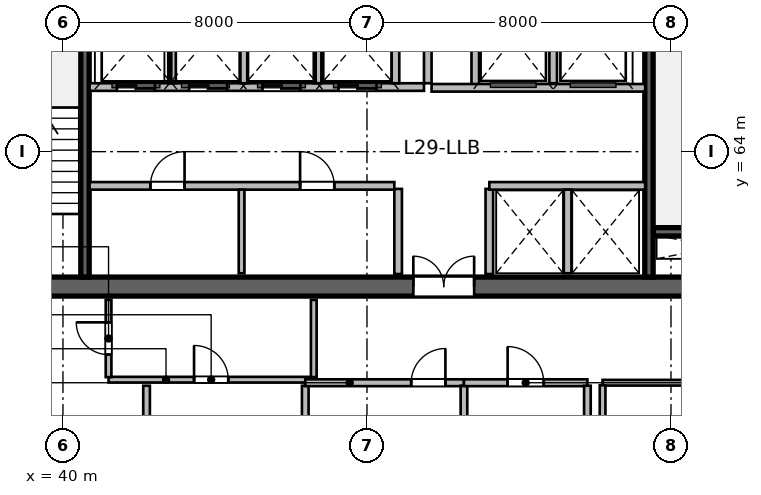
"""IFC4 building model, lengths in metres.
Left out: names, types, materials, properties, quantities, classifications, styles, units other than length and angle.
Written with IfcOpenShell. Run it as: python <this file> out.ifc"""

import sys

from ifc_helpers import new_model, si_unit, direction, frame, frame_2d, origin, place, context, subcontext, project, spatial, rectangle, extrude, source, transform, mapped, element, fill, save


model = new_model("IFC4")
c1 = context("Model", 3, precision=1e-05, world=origin(), true_north=direction((0.0, 1.0)))
c2 = subcontext(c1, "Body", "Model", "MODEL_VIEW")
j1 = project(units=[si_unit("LENGTHUNIT", "METRE"), si_unit("PLANEANGLEUNIT", "RADIAN")], contexts=[c1])
p1 = place(None, origin())
s1 = spatial("IfcSite", under=j1, at=p1, CompositionType="ELEMENT")
p2 = place(p1, origin())
s2 = spatial("IfcBuilding", under=s1, at=p2, CompositionType="ELEMENT")
p3 = place(p2, frame((0.0, 0.0, 123.3)))
s3 = spatial("IfcBuildingStorey", under=s2, at=p3, CompositionType="ELEMENT", Elevation=123.3)
m1 = source(origin(), c2, "Body", "SweptSolid", [
    extrude(rectangle(XDim=21.6, YDim=0.5, at=frame_2d((10.8, 0.0))), origin(), (0.0, 0.0, 1.0), 3.9),
])
p4 = place(p3, frame((37.2, 60.45, 0.0), z_axis=(0.0, 0.0, 1.0), x_axis=(1.0, 0.0, 0.0)))
e1 = element("IfcWall", 1, at=p4, inside=s3, PredefinedType="SHEAR", context=c2, shape_type="MappedRepresentation", body=[
    mapped(m1, transform((0.0, 0.0, 0.0), scale=1.0)),
])
p5 = place(p4, frame((1.1, 0.0, 0.0)))
e2 = element("IfcOpeningElement", 2, at=p5, cuts=e1, PredefinedType="OPENING", context=c2, shape_type="SweptSolid", body=[
    extrude(rectangle(XDim=1.15, YDim=2.15, at=frame_2d((0.575, 1.075))), frame((0.0, 0.26, 0.0), z_axis=(0.0, -1.0, 0.0), x_axis=(1.0, 0.0, 0.0)), (0.0, 0.0, 1.0), 0.52),
])
p6 = place(p4, frame((19.5, 0.0, 0.0)))
e3 = element("IfcOpeningElement", 3, at=p6, cuts=e1, PredefinedType="OPENING", context=c2, shape_type="SweptSolid", body=[
    extrude(rectangle(XDim=0.9, YDim=2.1, at=frame_2d((0.45, 1.05))), frame((0.0, 0.26, 0.0), z_axis=(0.0, -1.0, 0.0), x_axis=(1.0, 0.0, 0.0)), (0.0, 0.0, 1.0), 0.52),
])
p7 = place(p4, frame((12.02, 0.0, 0.0)))
e4 = element("IfcOpeningElement", 4, at=p7, cuts=e1, PredefinedType="OPENING", context=c2, shape_type="SweptSolid", body=[
    extrude(rectangle(XDim=1.6, YDim=2.15, at=frame_2d((0.8, 1.075))), frame((0.0, 0.26, 0.0), z_axis=(0.0, -1.0, 0.0), x_axis=(1.0, 0.0, 0.0)), (0.0, 0.0, 1.0), 0.52),
])
m2 = source(origin(), c2, "Body", "SweptSolid", [
    extrude(rectangle(XDim=3.27, YDim=0.22, at=frame_2d((1.635, 0.0))), origin(), (0.0, 0.0, 1.0), 3.9),
])
p8 = place(p3, frame((55.53, 61.89, 0.0), z_axis=(0.0, 0.0, 1.0), x_axis=(1.0, 0.0, 0.0)))
e5 = element("IfcWall", 5, at=p8, inside=s3, PredefinedType="SHEAR", context=c2, shape_type="MappedRepresentation", body=[
    mapped(m2, transform((0.0, 0.0, 0.0), scale=1.0)),
])
m3 = source(origin(), c2, "Body", "SweptSolid", [
    extrude(rectangle(XDim=11.0, YDim=0.22, at=frame_2d((5.5, 0.0))), origin(), (0.0, 0.0, 1.0), 3.9),
])
p9 = place(p3, frame((40.58, 60.7, 0.0), z_axis=(0.0, 0.0, 1.0), x_axis=(0.0, 1.0, 0.0)))
e6 = element("IfcWall", 6, at=p9, inside=s3, PredefinedType="SHEAR", context=c2, shape_type="MappedRepresentation", body=[
    mapped(m3, transform((0.0, 0.0, 0.0), scale=1.0)),
])
p10 = place(p3, frame((55.42, 60.7, 0.0), z_axis=(0.0, 0.0, 1.0), x_axis=(0.0, 1.0, 0.0)))
e7 = element("IfcWall", 7, at=p10, inside=s3, PredefinedType="SHEAR", context=c2, shape_type="MappedRepresentation", body=[
    mapped(m3, transform((0.0, 0.0, 0.0), scale=1.0)),
])
p11 = place(p10, frame((9.545, 0.0, 0.0)))
e8 = element("IfcOpeningElement", 8, at=p11, cuts=e7, PredefinedType="OPENING", context=c2, shape_type="SweptSolid", body=[
    extrude(rectangle(XDim=1.15, YDim=2.15, at=frame_2d((0.575, 1.075))), frame((0.0, 0.12, 0.0), z_axis=(0.0, -1.0, 0.0), x_axis=(1.0, 0.0, 0.0)), (0.0, 0.0, 1.0), 0.24),
])
m4 = source(origin(), c2, "Body", "SweptSolid", [
    extrude(rectangle(XDim=2.24, YDim=0.2, at=frame_2d((1.12, 0.0))), origin(), (0.0, 0.0, 1.0), 3.65),
])
for number, where, z_axis, x_axis in (
    (9, (48.82, 60.78, 0.0), (0.0, 0.0, 1.0), (0.0, 1.0, 0.0)),
    (10, (51.22, 60.78, 0.0), (0.0, 0.0, 1.0), (0.0, 1.0, 0.0)),
):
    element("IfcWall", number, at=place(p3, frame(where, z_axis=z_axis, x_axis=x_axis)), inside=s3, PredefinedType="SOLIDWALL", context=c2, shape_type="MappedRepresentation", body=[
        mapped(m4, transform((0.0, 0.0, 0.0), scale=1.0)),
    ])
m5 = source(origin(), c2, "Body", "SweptSolid", [
    extrude(rectangle(XDim=5.8, YDim=0.2, at=frame_2d((2.9, 0.0))), origin(), (0.0, 0.0, 1.0), 3.65),
])
p12 = place(p3, frame((49.6, 65.8, 0.0), z_axis=(0.0, 0.0, 1.0), x_axis=(0.0, 1.0, 0.0)))
e11 = element("IfcWall", 11, at=p12, inside=s3, PredefinedType="SOLIDWALL", context=c2, shape_type="MappedRepresentation", body=[
    mapped(m5, transform((0.0, 0.0, 0.0), scale=1.0)),
])
m6 = source(origin(), c2, "Body", "SweptSolid", [
    extrude(rectangle(XDim=2.58, YDim=0.2, at=frame_2d((1.29, 0.0))), origin(), (0.0, 0.0, 1.0), 3.65),
])
p13 = place(p3, frame((50.85, 65.68, 0.0), z_axis=(0.0, 0.0, 1.0), x_axis=(0.0, 1.0, 0.0)))
e12 = element("IfcWall", 12, at=p13, inside=s3, PredefinedType="SOLIDWALL", context=c2, shape_type="MappedRepresentation", body=[
    mapped(m6, transform((0.0, 0.0, 0.0), scale=1.0)),
])
m7 = source(origin(), c2, "Body", "SweptSolid", [
    extrude(rectangle(XDim=2.4, YDim=0.2, at=frame_2d((1.2, 0.0))), origin(), (0.0, 0.0, 1.0), 3.65),
])
p14 = place(p3, frame((52.9, 65.8, 0.0), z_axis=(0.0, 0.0, 1.0), x_axis=(0.0, 1.0, 0.0)))
e13 = element("IfcWall", 13, at=p14, inside=s3, PredefinedType="SOLIDWALL", context=c2, shape_type="MappedRepresentation", body=[
    mapped(m7, transform((0.0, 0.0, 0.0), scale=1.0)),
])
m8 = source(origin(), c2, "Body", "SweptSolid", [
    extrude(rectangle(XDim=5.62, YDim=0.2, at=frame_2d((2.81, 0.0))), origin(), (0.0, 0.0, 1.0), 3.65),
])
p15 = place(p3, frame((49.7, 65.68, 0.0), z_axis=(0.0, 0.0, 1.0), x_axis=(1.0, 0.0, 0.0)))
e14 = element("IfcWall", 14, at=p15, inside=s3, PredefinedType="SOLIDWALL", context=c2, shape_type="MappedRepresentation", body=[
    mapped(m8, transform((0.0, 0.0, 0.0), scale=1.0)),
])
m9 = source(origin(), c2, "Body", "SweptSolid", [
    extrude(rectangle(XDim=8.02, YDim=0.2, at=frame_2d((4.01, 0.0))), origin(), (0.0, 0.0, 1.0), 3.65),
])
p16 = place(p3, frame((40.7, 63.1, 0.0), z_axis=(0.0, 0.0, 1.0), x_axis=(1.0, 0.0, 0.0)))
e15 = element("IfcWall", 15, at=p16, inside=s3, PredefinedType="SOLIDWALL", context=c2, shape_type="MappedRepresentation", body=[
    mapped(m9, transform((0.0, 0.0, 0.0), scale=1.0)),
])
p17 = place(p16, frame((1.6, 0.0, 0.0)))
e16 = element("IfcOpeningElement", 16, at=p17, cuts=e15, PredefinedType="OPENING", context=c2, shape_type="SweptSolid", body=[
    extrude(rectangle(XDim=0.9, YDim=2.1, at=frame_2d((0.45, 1.05))), frame((0.0, 0.11, 0.0), z_axis=(0.0, -1.0, 0.0), x_axis=(1.0, 0.0, 0.0)), (0.0, 0.0, 1.0), 0.22),
])
p18 = place(p16, frame((5.54, 0.0, 0.0)))
e17 = element("IfcOpeningElement", 17, at=p18, cuts=e15, PredefinedType="OPENING", context=c2, shape_type="SweptSolid", body=[
    extrude(rectangle(XDim=0.9, YDim=2.1, at=frame_2d((0.45, 1.05))), frame((0.0, 0.11, 0.0), z_axis=(0.0, -1.0, 0.0), x_axis=(1.0, 0.0, 0.0)), (0.0, 0.0, 1.0), 0.22),
])
m10 = source(origin(), c2, "Body", "SweptSolid", [
    extrude(rectangle(XDim=4.1, YDim=0.2, at=frame_2d((2.05, 0.0))), origin(), (0.0, 0.0, 1.0), 3.65),
])
p19 = place(p3, frame((51.22, 63.1, 0.0), z_axis=(0.0, 0.0, 1.0), x_axis=(1.0, 0.0, 0.0)))
e18 = element("IfcWall", 18, at=p19, inside=s3, PredefinedType="SOLIDWALL", context=c2, shape_type="MappedRepresentation", body=[
    mapped(m10, transform((0.0, 0.0, 0.0), scale=1.0)),
])
m11 = source(origin(), c2, "Body", "SweptSolid", [
    extrude(rectangle(XDim=2.2, YDim=0.15, at=frame_2d((1.1, 0.0))), origin(), (0.0, 0.0, 1.0), 3.65),
])
p20 = place(p3, frame((44.7, 60.8, 0.0), z_axis=(0.0, 0.0, 1.0), x_axis=(0.0, 1.0, 0.0)))
e19 = element("IfcWall", 19, at=p20, inside=s3, PredefinedType="PARTITIONING", context=c2, shape_type="MappedRepresentation", body=[
    mapped(m11, transform((0.0, 0.0, 0.0), scale=1.0)),
])
m12 = source(origin(), c2, "Body", "SweptSolid", [
    extrude(rectangle(XDim=2.2, YDim=0.2, at=frame_2d((1.1, 0.0))), origin(), (0.0, 0.0, 1.0), 3.65),
])
p21 = place(p3, frame((53.28, 60.8, 0.0), z_axis=(0.0, 0.0, 1.0), x_axis=(0.0, 1.0, 0.0)))
e20 = element("IfcWall", 20, at=p21, inside=s3, PredefinedType="SOLIDWALL", context=c2, shape_type="MappedRepresentation", body=[
    mapped(m12, transform((0.0, 0.0, 0.0), scale=1.0)),
])
m13 = source(origin(), c2, "Body", "SweptSolid", [
    extrude(rectangle(XDim=8.8, YDim=0.2, at=frame_2d((4.4, 0.0))), origin(), (0.0, 0.0, 1.0), 3.65),
])
p22 = place(p3, frame((40.7, 65.7, 0.0), z_axis=(0.0, 0.0, 1.0), x_axis=(1.0, 0.0, 0.0)))
e21 = element("IfcWall", 21, at=p22, inside=s3, PredefinedType="SOLIDWALL", context=c2, shape_type="MappedRepresentation", body=[
    mapped(m13, transform((0.0, 0.0, 0.0), scale=1.0)),
])
p23 = place(p22, frame((0.72, 0.0, 0.0)))
e22 = element("IfcOpeningElement", 22, at=p23, cuts=e21, PredefinedType="OPENING", context=c2, shape_type="SweptSolid", body=[
    extrude(rectangle(XDim=1.0, YDim=2.15, at=frame_2d((0.5, 1.075))), frame((0.0, 0.11, 0.0), z_axis=(0.0, -1.0, 0.0), x_axis=(1.0, 0.0, 0.0)), (0.0, 0.0, 1.0), 0.22),
])
p24 = place(p22, frame((2.62, 0.0, 0.0)))
e23 = element("IfcOpeningElement", 23, at=p24, cuts=e21, PredefinedType="OPENING", context=c2, shape_type="SweptSolid", body=[
    extrude(rectangle(XDim=1.0, YDim=2.15, at=frame_2d((0.5, 1.075))), frame((0.0, 0.11, 0.0), z_axis=(0.0, -1.0, 0.0), x_axis=(1.0, 0.0, 0.0)), (0.0, 0.0, 1.0), 0.22),
])
p25 = place(p22, frame((4.55, 0.0, 0.0)))
e24 = element("IfcOpeningElement", 24, at=p25, cuts=e21, PredefinedType="OPENING", context=c2, shape_type="SweptSolid", body=[
    extrude(rectangle(XDim=1.0, YDim=2.15, at=frame_2d((0.5, 1.075))), frame((0.0, 0.11, 0.0), z_axis=(0.0, -1.0, 0.0), x_axis=(1.0, 0.0, 0.0)), (0.0, 0.0, 1.0), 0.22),
])
p26 = place(p22, frame((6.55, 0.0, 0.0)))
e25 = element("IfcOpeningElement", 25, at=p26, cuts=e21, PredefinedType="OPENING", context=c2, shape_type="SweptSolid", body=[
    extrude(rectangle(XDim=1.0, YDim=2.15, at=frame_2d((0.5, 1.075))), frame((0.0, 0.11, 0.0), z_axis=(0.0, -1.0, 0.0), x_axis=(1.0, 0.0, 0.0)), (0.0, 0.0, 1.0), 0.22),
])
for number, where, z_axis, x_axis in (
    (26, (48.75, 65.8, 0.0), (0.0, 0.0, 1.0), (0.0, 1.0, 0.0)),
    (27, (42.87, 65.8, 0.0), (0.0, 0.0, 1.0), (0.0, 1.0, 0.0)),
    (28, (44.77, 65.8, 0.0), (0.0, 0.0, 1.0), (0.0, 1.0, 0.0)),
    (29, (46.7, 65.8, 0.0), (0.0, 0.0, 1.0), (0.0, 1.0, 0.0)),
):
    element("IfcWall", number, at=place(p3, frame(where, z_axis=z_axis, x_axis=x_axis)), inside=s3, PredefinedType="SOLIDWALL", context=c2, shape_type="MappedRepresentation", body=[
        mapped(m7, transform((0.0, 0.0, 0.0), scale=1.0)),
    ])
m14 = source(origin(), c2, "Body", "SweptSolid", [
    extrude(rectangle(XDim=5.4, YDim=0.15, at=frame_2d((2.7, 0.0))), origin(), (0.0, 0.0, 1.0), 3.65),
])
p27 = place(p3, frame((41.2, 58.0, 0.0), z_axis=(0.0, 0.0, 1.0), x_axis=(1.0, 0.0, 0.0)))
e30 = element("IfcWall", 30, at=p27, inside=s3, PredefinedType="PARTITIONING", context=c2, shape_type="MappedRepresentation", body=[
    mapped(m14, transform((0.0, 0.0, 0.0), scale=1.0)),
])
p28 = place(p27, frame((2.25, 0.0, 0.0)))
e31 = element("IfcOpeningElement", 31, at=p28, cuts=e30, PredefinedType="OPENING", context=c2, shape_type="SweptSolid", body=[
    extrude(rectangle(XDim=0.9, YDim=2.08, at=frame_2d((0.45, 1.04))), frame((0.0, 0.085, 0.0), z_axis=(0.0, -1.0, 0.0), x_axis=(1.0, 0.0, 0.0)), (0.0, 0.0, 1.0), 0.17),
])
m15 = source(origin(), c2, "Body", "SweptSolid", [
    extrude(rectangle(XDim=2.033, YDim=0.15, at=frame_2d((1.016, 0.0))), origin(), (0.0, 0.0, 1.0), 3.65),
])
p29 = place(p3, frame((41.2, 58.067, 0.0), z_axis=(0.0, 0.0, 1.0), x_axis=(0.0, 1.0, 0.0)))
e32 = element("IfcWall", 32, at=p29, inside=s3, PredefinedType="PARTITIONING", context=c2, shape_type="MappedRepresentation", body=[
    mapped(m15, transform((0.0, 0.0, 0.0), scale=1.0)),
])
p30 = place(p29, frame((0.591, 0.0, 0.0)))
e33 = element("IfcOpeningElement", 33, at=p30, cuts=e32, PredefinedType="OPENING", context=c2, shape_type="SweptSolid", body=[
    extrude(rectangle(XDim=0.85, YDim=2.1, at=frame_2d((0.425, 1.05))), frame((0.0, 0.085, 0.0), z_axis=(0.0, -1.0, 0.0), x_axis=(1.0, 0.0, 0.0)), (0.0, 0.0, 1.0), 0.17),
])
p31 = place(p3, frame((46.6, 58.067, 0.0), z_axis=(0.0, 0.0, 1.0), x_axis=(0.0, 1.0, 0.0)))
e34 = element("IfcWall", 34, at=p31, inside=s3, PredefinedType="PARTITIONING", context=c2, shape_type="MappedRepresentation", body=[
    mapped(m15, transform((0.0, 0.0, 0.0), scale=1.0)),
])
m16 = source(origin(), c2, "Body", "SweptSolid", [
    extrude(rectangle(XDim=3.763, YDim=0.175, at=frame_2d((1.881, 0.0))), origin(), (0.0, 0.0, 1.0), 3.65),
])
for number, where, z_axis, x_axis in (
    (35, (42.2, 54.079, 0.0), (0.0, 0.0, 1.0), (0.0, 1.0, 0.0)),
    (36, (46.376, 54.079, 0.0), (0.0, 0.0, 1.0), (0.0, 1.0, 0.0)),
):
    element("IfcWall", number, at=place(p3, frame(where, z_axis=z_axis, x_axis=x_axis)), inside=s3, PredefinedType="PARTITIONING", context=c2, shape_type="MappedRepresentation", body=[
        mapped(m16, transform((0.0, 0.0, 0.0), scale=1.0)),
    ])
m17 = source(origin(), c2, "Body", "SweptSolid", [
    extrude(rectangle(XDim=4.176, YDim=0.18, at=frame_2d((2.088, 0.0))), origin(), (0.0, 0.0, 1.0), 3.65),
])
p32 = place(p3, frame((46.376, 57.92, 0.0), z_axis=(0.0, 0.0, 1.0), x_axis=(1.0, 0.0, 0.0)))
e37 = element("IfcWall", 37, at=p32, inside=s3, PredefinedType="PLUMBINGWALL", context=c2, shape_type="MappedRepresentation", body=[
    mapped(m17, transform((0.0, 0.0, 0.0), scale=1.0)),
])
p33 = place(p32, frame((2.788, 0.0, 0.0)))
e38 = element("IfcOpeningElement", 38, at=p33, cuts=e37, PredefinedType="OPENING", context=c2, shape_type="SweptSolid", body=[
    extrude(rectangle(XDim=0.9, YDim=2.08, at=frame_2d((0.45, 1.04))), frame((0.0, 0.1, 0.0), z_axis=(0.0, -1.0, 0.0), x_axis=(1.0, 0.0, 0.0)), (0.0, 0.0, 1.0), 0.2),
])
p34 = place(p3, frame((50.552, 54.079, 0.0), z_axis=(0.0, 0.0, 1.0), x_axis=(0.0, 1.0, 0.0)))
e39 = element("IfcWall", 39, at=p34, inside=s3, PredefinedType="PARTITIONING", context=c2, shape_type="MappedRepresentation", body=[
    mapped(m16, transform((0.0, 0.0, 0.0), scale=1.0)),
])
m18 = source(origin(), c2, "Body", "SweptSolid", [
    extrude(rectangle(XDim=3.248, YDim=0.18, at=frame_2d((1.624, 0.0))), origin(), (0.0, 0.0, 1.0), 3.65),
])
p35 = place(p3, frame((50.552, 57.92, 0.0), z_axis=(0.0, 0.0, 1.0), x_axis=(1.0, 0.0, 0.0)))
e40 = element("IfcWall", 40, at=p35, inside=s3, PredefinedType="PLUMBINGWALL", context=c2, shape_type="MappedRepresentation", body=[
    mapped(m18, transform((0.0, 0.0, 0.0), scale=1.0)),
])
p36 = place(p35, frame((1.149, 0.0, 0.0)))
e41 = element("IfcOpeningElement", 41, at=p36, cuts=e40, PredefinedType="OPENING", context=c2, shape_type="SweptSolid", body=[
    extrude(rectangle(XDim=0.95, YDim=2.12, at=frame_2d((0.475, 1.06))), frame((0.0, 0.1, 0.0), z_axis=(0.0, -1.0, 0.0), x_axis=(1.0, 0.0, 0.0)), (0.0, 0.0, 1.0), 0.2),
])
p37 = place(p3, frame((53.8, 54.079, 0.0), z_axis=(0.0, 0.0, 1.0), x_axis=(0.0, 1.0, 0.0)))
e42 = element("IfcWall", 42, at=p37, inside=s3, PredefinedType="PARTITIONING", context=c2, shape_type="MappedRepresentation", body=[
    mapped(m16, transform((0.0, 0.0, 0.0), scale=1.0)),
])
m19 = source(origin(), c2, "Body", "SweptSolid", [
    extrude(rectangle(XDim=6.6, YDim=0.15, at=frame_2d((3.3, 0.0))), origin(), (0.0, 0.0, 1.0), 3.65),
])
p38 = place(p3, frame((54.2, 57.92, 0.0), z_axis=(0.0, 0.0, 1.0), x_axis=(1.0, 0.0, 0.0)))
e43 = element("IfcWall", 43, at=p38, inside=s3, PredefinedType="PARTITIONING", context=c2, shape_type="MappedRepresentation", body=[
    mapped(m19, transform((0.0, 0.0, 0.0), scale=1.0)),
])
p39 = place(p38, frame((2.825, 0.0, 0.0)))
e44 = element("IfcOpeningElement", 44, at=p39, cuts=e43, PredefinedType="OPENING", context=c2, shape_type="SweptSolid", body=[
    extrude(rectangle(XDim=0.95, YDim=2.1, at=frame_2d((0.475, 1.05))), frame((0.0, 0.085, 0.0), z_axis=(0.0, -1.0, 0.0), x_axis=(1.0, 0.0, 0.0)), (0.0, 0.0, 1.0), 0.17),
])
m20 = source(origin(), c2, "Body", "SweptSolid", [
    extrude(rectangle(XDim=3.785, YDim=0.15, at=frame_2d((1.893, 0.0))), origin(), (0.0, 0.0, 1.0), 3.65),
])
p40 = place(p3, frame((54.2, 54.067, 0.0), z_axis=(0.0, 0.0, 1.0), x_axis=(0.0, 1.0, 0.0)))
e45 = element("IfcWall", 45, at=p40, inside=s3, PredefinedType="PARTITIONING", context=c2, shape_type="MappedRepresentation", body=[
    mapped(m20, transform((0.0, 0.0, 0.0), scale=1.0)),
])
m21 = source(origin(), c2, "Body", "SweptSolid", [
    extrude(rectangle(XDim=1.6, YDim=2.15, at=frame_2d((0.8, 1.075))), frame((0.0, 0.025, 0.0), z_axis=(0.0, -1.0, 0.0), x_axis=(1.0, 0.0, 0.0)), (0.0, 0.0, 1.0), 0.05),
])
p41 = place(p7, origin())
e46 = element("IfcDoor", 46, at=p41, inside=s3, OperationType="DOUBLE_DOOR_SINGLE_SWING", PredefinedType="DOOR", context=c2, shape_type="MappedRepresentation", body=[
    mapped(m21, transform((0.0, 0.0, 0.0), scale=1.0)),
])
fill(e4, e46)
m22 = source(origin(), c2, "Body", "SweptSolid", [
    extrude(rectangle(XDim=0.9, YDim=2.1, at=frame_2d((0.45, 1.05))), frame((0.0, 0.025, 0.0), z_axis=(0.0, -1.0, 0.0), x_axis=(1.0, 0.0, 0.0)), (0.0, 0.0, 1.0), 0.05),
])
p42 = place(p17, origin())
e47 = element("IfcDoor", 47, at=p42, inside=s3, OperationType="SINGLE_SWING_RIGHT", PredefinedType="DOOR", context=c2, shape_type="MappedRepresentation", body=[
    mapped(m22, transform((0.0, 0.0, 0.0), scale=1.0)),
])
fill(e16, e47)
p43 = place(p18, origin())
e48 = element("IfcDoor", 48, at=p43, inside=s3, OperationType="SINGLE_SWING_LEFT", PredefinedType="DOOR", context=c2, shape_type="MappedRepresentation", body=[
    mapped(m22, transform((0.0, 0.0, 0.0), scale=1.0)),
])
fill(e17, e48)
m23 = source(origin(), c2, "Body", "SweptSolid", [
    extrude(rectangle(XDim=1.0, YDim=2.15, at=frame_2d((0.5, 1.075))), frame((0.0, 0.025, 0.0), z_axis=(0.0, -1.0, 0.0), x_axis=(1.0, 0.0, 0.0)), (0.0, 0.0, 1.0), 0.05),
])
p44 = place(p23, origin())
e49 = element("IfcDoor", 49, at=p44, inside=s3, OperationType="DOUBLE_DOOR_SLIDING", PredefinedType="DOOR", context=c2, shape_type="MappedRepresentation", body=[
    mapped(m23, transform((0.0, 0.0, 0.0), scale=1.0)),
])
fill(e22, e49)
p45 = place(p24, origin())
e50 = element("IfcDoor", 50, at=p45, inside=s3, OperationType="DOUBLE_DOOR_SLIDING", PredefinedType="DOOR", context=c2, shape_type="MappedRepresentation", body=[
    mapped(m23, transform((0.0, 0.0, 0.0), scale=1.0)),
])
fill(e23, e50)
p46 = place(p25, origin())
e51 = element("IfcDoor", 51, at=p46, inside=s3, OperationType="DOUBLE_DOOR_SLIDING", PredefinedType="DOOR", context=c2, shape_type="MappedRepresentation", body=[
    mapped(m23, transform((0.0, 0.0, 0.0), scale=1.0)),
])
fill(e24, e51)
p47 = place(p26, origin())
e52 = element("IfcDoor", 52, at=p47, inside=s3, OperationType="DOUBLE_DOOR_SLIDING", PredefinedType="DOOR", context=c2, shape_type="MappedRepresentation", body=[
    mapped(m23, transform((0.0, 0.0, 0.0), scale=1.0)),
])
fill(e25, e52)
m24 = source(origin(), c2, "Body", "SweptSolid", [
    extrude(rectangle(XDim=0.85, YDim=2.1, at=frame_2d((0.425, 1.05))), frame((0.0, 0.025, 0.0), z_axis=(0.0, -1.0, 0.0), x_axis=(1.0, 0.0, 0.0)), (0.0, 0.0, 1.0), 0.05),
])
p48 = place(p30, origin())
e53 = element("IfcDoor", 53, at=p48, inside=s3, OperationType="SINGLE_SWING_RIGHT", PredefinedType="DOOR", context=c2, shape_type="MappedRepresentation", body=[
    mapped(m24, transform((0.0, 0.0, 0.0), scale=1.0)),
])
fill(e33, e53)
m25 = source(origin(), c2, "Body", "SweptSolid", [
    extrude(rectangle(XDim=0.9, YDim=2.08, at=frame_2d((0.45, 1.04))), frame((0.0, 0.025, 0.0), z_axis=(0.0, -1.0, 0.0), x_axis=(1.0, 0.0, 0.0)), (0.0, 0.0, 1.0), 0.05),
])
p49 = place(p28, origin())
e54 = element("IfcDoor", 54, at=p49, inside=s3, OperationType="SINGLE_SWING_LEFT", PredefinedType="DOOR", context=c2, shape_type="MappedRepresentation", body=[
    mapped(m25, transform((0.0, 0.0, 0.0), scale=1.0)),
])
fill(e31, e54)
p50 = place(p33, origin())
e55 = element("IfcDoor", 55, at=p50, inside=s3, OperationType="SINGLE_SWING_RIGHT", PredefinedType="DOOR", context=c2, shape_type="MappedRepresentation", body=[
    mapped(m25, transform((0.0, 0.0, 0.0), scale=1.0)),
])
fill(e38, e55)
m26 = source(origin(), c2, "Body", "SweptSolid", [
    extrude(rectangle(XDim=0.95, YDim=2.12, at=frame_2d((0.475, 1.06))), frame((0.0, 0.025, 0.0), z_axis=(0.0, -1.0, 0.0), x_axis=(1.0, 0.0, 0.0)), (0.0, 0.0, 1.0), 0.05),
])
p51 = place(p36, origin())
e56 = element("IfcDoor", 56, at=p51, inside=s3, OperationType="SINGLE_SWING_LEFT", PredefinedType="DOOR", context=c2, shape_type="MappedRepresentation", body=[
    mapped(m26, transform((0.0, 0.0, 0.0), scale=1.0)),
])
fill(e41, e56)
save(model, sys.argv[1])
